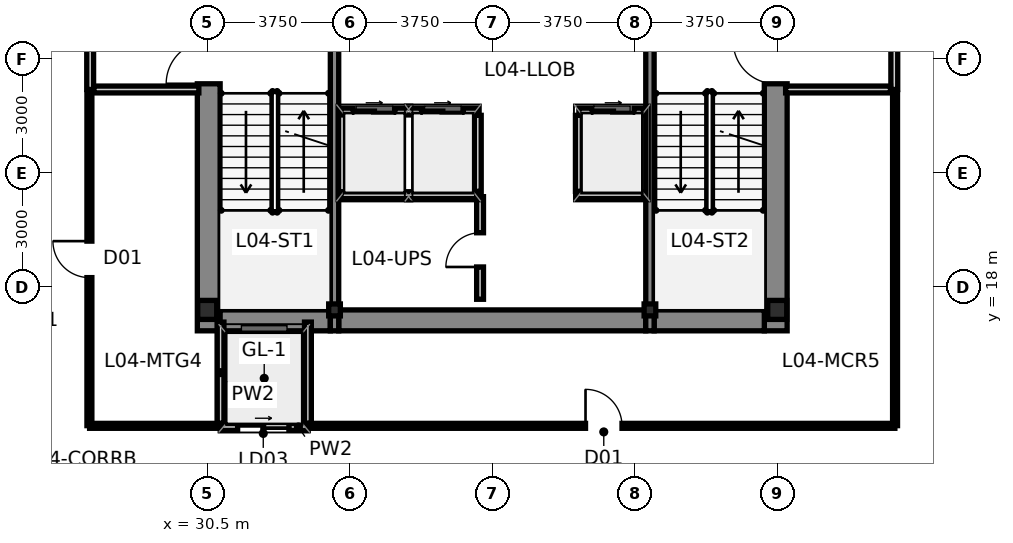
"""IFC4 building model, lengths in metres.
Left out: names, types, materials, properties, quantities, classifications, styles, units other than length and angle.
Written with IfcOpenShell. Run it as: python <this file> out.ifc"""

import sys

from ifc_helpers import new_model, si_unit, direction, frame, frame_2d, origin, origin_2d, place, context, subcontext, project, spatial, rectangle, i_section, extrude, source, transform, mapped, element, fill, save


model = new_model("IFC4")
c1 = context("Model", 3, precision=1e-05, world=origin(), true_north=direction((0.0, 1.0)))
c2 = subcontext(c1, "Body", "Model", "MODEL_VIEW")
j1 = project(units=[si_unit("LENGTHUNIT", "METRE"), si_unit("PLANEANGLEUNIT", "RADIAN")], contexts=[c1])
p1 = place(None, origin())
s1 = spatial("IfcSite", under=j1, at=p1, CompositionType="ELEMENT")
p2 = place(p1, origin())
s2 = spatial("IfcBuilding", under=s1, at=p2, CompositionType="ELEMENT")
p3 = place(p2, frame((0.0, 0.0, 18.9)))
s3 = spatial("IfcBuildingStorey", under=s2, at=p3, CompositionType="ELEMENT", Elevation=18.9)
m1 = source(origin(), c2, "Body", "SweptSolid", [
    extrude(i_section(OverallWidth=0.5, OverallDepth=0.5, WebThickness=0.028, FlangeThickness=0.04, at=origin_2d()), origin(), (0.0, 0.0, 1.0), 4.2),
])
for number, where, z_axis, x_axis in (
    (1, (30.5, 17.4, 0.0), (0.0, 0.0, 1.0), (1.0, 0.0, 0.0)),
    (2, (45.5, 17.4, 0.0), (0.0, 0.0, 1.0), (1.0, 0.0, 0.0)),
):
    element("IfcColumn", number, at=place(p3, frame(where, z_axis=z_axis, x_axis=x_axis)), inside=s3, PredefinedType="COLUMN", context=c2, shape_type="MappedRepresentation", body=[
        mapped(m1, transform((0.0, 0.0, 0.0), scale=1.0)),
    ])
m2 = source(origin(), c2, "Body", "SweptSolid", [
    extrude(i_section(OverallWidth=0.307, OverallDepth=0.315, WebThickness=0.012, FlangeThickness=0.019, at=origin_2d()), origin(), (0.0, 0.0, 1.0), 4.2),
])
for number, where, z_axis, x_axis in (
    (3, (33.85, 17.4, 0.0), (0.0, 0.0, 1.0), (1.0, 0.0, 0.0)),
    (4, (42.15, 17.4, 0.0), (0.0, 0.0, 1.0), (1.0, 0.0, 0.0)),
):
    element("IfcColumn", number, at=place(p3, frame(where, z_axis=z_axis, x_axis=x_axis)), inside=s3, PredefinedType="COLUMN", context=c2, shape_type="MappedRepresentation", body=[
        mapped(m2, transform((0.0, 0.0, 0.0), scale=1.0)),
    ])
p4 = place(p3, frame((30.54, 16.85, 0.0), z_axis=(0.0, 0.0, 1.0), x_axis=(0.0, 1.0, 0.0)))
e5 = element("IfcWall", 5, at=p4, inside=s3, PredefinedType="SHEAR", context=c2, shape_type="SweptSolid", body=[
    extrude(rectangle(XDim=13.425, YDim=0.6, at=frame_2d((6.712, 0.0))), origin(), (0.0, 0.0, 1.0), 4.2),
])
p5 = place(p4, frame((6.5, 0.0, 0.0)))
e6 = element("IfcOpeningElement", 6, at=p5, cuts=e5, PredefinedType="OPENING", context=c2, shape_type="SweptSolid", body=[
    extrude(rectangle(XDim=1.12, YDim=2.15, at=frame_2d((0.56, 1.075))), frame((0.0, 0.312, 0.0), z_axis=(0.0, -1.0, 0.0), x_axis=(1.0, 0.0, 0.0)), (0.0, 0.0, 1.0), 0.624),
])
p6 = place(p4, frame((10.95, 0.0, 0.0)))
e7 = element("IfcOpeningElement", 7, at=p6, cuts=e5, PredefinedType="OPENING", context=c2, shape_type="SweptSolid", body=[
    extrude(rectangle(XDim=1.2, YDim=2.2, at=frame_2d((0.6, 1.1))), frame((0.0, 0.312, 0.0), z_axis=(0.0, -1.0, 0.0), x_axis=(1.0, 0.0, 0.0)), (0.0, 0.0, 1.0), 0.624),
])
p7 = place(p3, frame((45.46, 16.85, 0.0), z_axis=(0.0, 0.0, 1.0), x_axis=(0.0, 1.0, 0.0)))
e8 = element("IfcWall", 8, at=p7, inside=s3, PredefinedType="SHEAR", context=c2, shape_type="SweptSolid", body=[
    extrude(rectangle(XDim=13.425, YDim=0.6, at=frame_2d((6.712, 0.0))), origin(), (0.0, 0.0, 1.0), 4.2),
])
p8 = place(p7, frame((6.5, 0.0, 0.0)))
e9 = element("IfcOpeningElement", 9, at=p8, cuts=e8, PredefinedType="OPENING", context=c2, shape_type="SweptSolid", body=[
    extrude(rectangle(XDim=1.12, YDim=2.15, at=frame_2d((0.56, 1.075))), frame((0.0, 0.312, 0.0), z_axis=(0.0, -1.0, 0.0), x_axis=(1.0, 0.0, 0.0)), (0.0, 0.0, 1.0), 0.624),
])
p9 = place(p7, frame((10.95, 0.0, 0.0)))
e10 = element("IfcOpeningElement", 10, at=p9, cuts=e8, PredefinedType="OPENING", context=c2, shape_type="SweptSolid", body=[
    extrude(rectangle(XDim=1.2, YDim=2.2, at=frame_2d((0.6, 1.1))), frame((0.0, 0.312, 0.0), z_axis=(0.0, -1.0, 0.0), x_axis=(1.0, 0.0, 0.0)), (0.0, 0.0, 1.0), 0.624),
])
p10 = place(p3, frame((30.84, 17.125, 0.0), z_axis=(0.0, 0.0, 1.0), x_axis=(1.0, 0.0, 0.0)))
e11 = element("IfcWall", 11, at=p10, inside=s3, PredefinedType="SHEAR", context=c2, shape_type="SweptSolid", body=[
    extrude(rectangle(XDim=2.9, YDim=0.55, at=frame_2d((1.45, 0.0))), origin(), (0.0, 0.0, 1.0), 4.2),
])
p11 = place(p3, frame((33.96, 17.125, 0.0), z_axis=(0.0, 0.0, 1.0), x_axis=(1.0, 0.0, 0.0)))
e12 = element("IfcWall", 12, at=p11, inside=s3, PredefinedType="SHEAR", context=c2, shape_type="SweptSolid", body=[
    extrude(rectangle(XDim=8.08, YDim=0.55, at=frame_2d((4.04, 0.0))), origin(), (0.0, 0.0, 1.0), 4.2),
])
p12 = place(p3, frame((42.26, 17.125, 0.0), z_axis=(0.0, 0.0, 1.0), x_axis=(1.0, 0.0, 0.0)))
e13 = element("IfcWall", 13, at=p12, inside=s3, PredefinedType="SHEAR", context=c2, shape_type="SweptSolid", body=[
    extrude(rectangle(XDim=2.9, YDim=0.55, at=frame_2d((1.45, 0.0))), origin(), (0.0, 0.0, 1.0), 4.2),
])
for number, where, z_axis, x_axis in (
    (14, (33.85, 16.85, 0.0), (0.0, 0.0, 1.0), (0.0, 1.0, 0.0)),
    (15, (42.15, 16.85, 0.0), (0.0, 0.0, 1.0), (0.0, 1.0, 0.0)),
):
    element("IfcWall", number, at=place(p3, frame(where, z_axis=z_axis, x_axis=x_axis)), inside=s3, PredefinedType="SHEAR", context=c2, shape_type="SweptSolid", body=[
        extrude(rectangle(XDim=13.425, YDim=0.22, at=frame_2d((6.712, 0.0))), origin(), (0.0, 0.0, 1.0), 4.2),
    ])
p13 = place(p3, frame((30.85, 14.32, 0.0), z_axis=(0.0, 0.0, 1.0), x_axis=(1.0, 0.0, 0.0)))
e16 = element("IfcWall", 16, at=p13, inside=s3, PredefinedType="PARTITIONING", context=c2, shape_type="SweptSolid", body=[
    extrude(rectangle(XDim=2.3, YDim=0.18, at=frame_2d((1.15, 0.0))), origin(), (0.0, 0.0, 1.0), 3.75),
])
p14 = place(p13, frame((0.45, 0.0, 0.0)))
e17 = element("IfcOpeningElement", 17, at=p14, cuts=e16, PredefinedType="OPENING", context=c2, shape_type="SweptSolid", body=[
    extrude(rectangle(XDim=1.35, YDim=2.25, at=frame_2d((0.675, 1.125))), frame((0.0, 0.102, 0.0), z_axis=(0.0, -1.0, 0.0), x_axis=(1.0, 0.0, 0.0)), (0.0, 0.0, 1.0), 0.204),
])
p15 = place(p3, frame((30.85, 14.42, 0.0), z_axis=(0.0, 0.0, 1.0), x_axis=(0.0, 1.0, 0.0)))
e18 = element("IfcWall", 18, at=p15, inside=s3, PredefinedType="PARTITIONING", context=c2, shape_type="SweptSolid", body=[
    extrude(rectangle(XDim=2.66, YDim=0.18, at=frame_2d((1.33, 0.0))), origin(), (0.0, 0.0, 1.0), 3.124),
])
p16 = place(p3, frame((33.15, 14.42, 0.0), z_axis=(0.0, 0.0, 1.0), x_axis=(0.0, 1.0, 0.0)))
e19 = element("IfcWall", 19, at=p16, inside=s3, PredefinedType="PARTITIONING", context=c2, shape_type="SweptSolid", body=[
    extrude(rectangle(XDim=2.66, YDim=0.18, at=frame_2d((1.33, 0.0))), origin(), (0.0, 0.0, 1.0), 3.75),
])
p17 = place(p3, frame((34.02, 22.62, 0.0), z_axis=(0.0, 0.0, 1.0), x_axis=(1.0, 0.0, 0.0)))
e20 = element("IfcWall", 20, at=p17, inside=s3, PredefinedType="PARTITIONING", context=c2, shape_type="SweptSolid", body=[
    extrude(rectangle(XDim=3.6, YDim=0.18, at=frame_2d((1.8, 0.0))), origin(), (0.0, 0.0, 1.0), 3.75),
])
p18 = place(p17, frame((0.32, 0.0, 0.0)))
e21 = element("IfcOpeningElement", 21, at=p18, cuts=e20, PredefinedType="OPENING", context=c2, shape_type="SweptSolid", body=[
    extrude(rectangle(XDim=1.1, YDim=2.2, at=frame_2d((0.55, 1.1))), frame((0.0, 0.102, 0.0), z_axis=(0.0, -1.0, 0.0), x_axis=(1.0, 0.0, 0.0)), (0.0, 0.0, 1.0), 0.204),
])
p19 = place(p17, frame((2.12, 0.0, 0.0)))
e22 = element("IfcOpeningElement", 22, at=p19, cuts=e20, PredefinedType="OPENING", context=c2, shape_type="SweptSolid", body=[
    extrude(rectangle(XDim=1.1, YDim=2.2, at=frame_2d((0.55, 1.1))), frame((0.0, 0.102, 0.0), z_axis=(0.0, -1.0, 0.0), x_axis=(1.0, 0.0, 0.0)), (0.0, 0.0, 1.0), 0.204),
])
p20 = place(p3, frame((40.28, 22.62, 0.0), z_axis=(0.0, 0.0, 1.0), x_axis=(1.0, 0.0, 0.0)))
e23 = element("IfcWall", 23, at=p20, inside=s3, PredefinedType="PARTITIONING", context=c2, shape_type="SweptSolid", body=[
    extrude(rectangle(XDim=1.7, YDim=0.18, at=frame_2d((0.85, 0.0))), origin(), (0.0, 0.0, 1.0), 3.75),
])
p21 = place(p20, frame((0.35, 0.0, 0.0)))
e24 = element("IfcOpeningElement", 24, at=p21, cuts=e23, PredefinedType="OPENING", context=c2, shape_type="SweptSolid", body=[
    extrude(rectangle(XDim=1.1, YDim=2.2, at=frame_2d((0.55, 1.1))), frame((0.0, 0.102, 0.0), z_axis=(0.0, -1.0, 0.0), x_axis=(1.0, 0.0, 0.0)), (0.0, 0.0, 1.0), 0.204),
])
for number, where, z_axis, x_axis in (
    (25, (37.62, 20.52, 0.0), (0.0, 0.0, 1.0), (0.0, 1.0, 0.0)),
    (26, (40.28, 20.52, 0.0), (0.0, 0.0, 1.0), (0.0, 1.0, 0.0)),
):
    element("IfcWall", number, at=place(p3, frame(where, z_axis=z_axis, x_axis=x_axis)), inside=s3, PredefinedType="PARTITIONING", context=c2, shape_type="SweptSolid", body=[
        extrude(rectangle(XDim=2.0, YDim=0.18, at=frame_2d((1.0, 0.0))), origin(), (0.0, 0.0, 1.0), 3.75),
    ])
p22 = place(p3, frame((27.42, 23.2, 0.0), z_axis=(0.0, 0.0, 1.0), x_axis=(0.0, 1.0, 0.0)))
e27 = element("IfcWall", 27, at=p22, inside=s3, PredefinedType="PARTITIONING", context=c2, shape_type="SweptSolid", body=[
    extrude(rectangle(XDim=6.4, YDim=0.18, at=frame_2d((3.2, 0.0))), origin(), (0.0, 0.0, 1.0), 3.376),
])
p23 = place(p22, frame((2.65, 0.0, 0.0)))
e28 = element("IfcOpeningElement", 28, at=p23, cuts=e27, PredefinedType="OPENING", context=c2, shape_type="SweptSolid", body=[
    extrude(rectangle(XDim=1.05, YDim=2.15, at=frame_2d((0.525, 1.075))), frame((0.0, 0.102, 0.0), z_axis=(0.0, -1.0, 0.0), x_axis=(1.0, 0.0, 0.0)), (0.0, 0.0, 1.0), 0.204),
])
p24 = place(p3, frame((27.52, 23.2, 0.0), z_axis=(0.0, 0.0, 1.0), x_axis=(1.0, 0.0, 0.0)))
e29 = element("IfcWall", 29, at=p24, inside=s3, PredefinedType="PARTITIONING", context=c2, shape_type="SweptSolid", body=[
    extrude(rectangle(XDim=2.76, YDim=0.18, at=frame_2d((1.38, 0.0))), origin(), (0.0, 0.0, 1.0), 3.75),
])
p25 = place(p3, frame((48.58, 23.2, 0.0), z_axis=(0.0, 0.0, 1.0), x_axis=(0.0, 1.0, 0.0)))
e30 = element("IfcWall", 30, at=p25, inside=s3, PredefinedType="PARTITIONING", context=c2, shape_type="SweptSolid", body=[
    extrude(rectangle(XDim=6.4, YDim=0.18, at=frame_2d((3.2, 0.0))), origin(), (0.0, 0.0, 1.0), 3.75),
])
p26 = place(p25, frame((2.65, 0.0, 0.0)))
e31 = element("IfcOpeningElement", 31, at=p26, cuts=e30, PredefinedType="OPENING", context=c2, shape_type="SweptSolid", body=[
    extrude(rectangle(XDim=1.05, YDim=2.15, at=frame_2d((0.525, 1.075))), frame((0.0, 0.102, 0.0), z_axis=(0.0, -1.0, 0.0), x_axis=(1.0, 0.0, 0.0)), (0.0, 0.0, 1.0), 0.204),
])
p27 = place(p3, frame((45.72, 23.2, 0.0), z_axis=(0.0, 0.0, 1.0), x_axis=(1.0, 0.0, 0.0)))
e32 = element("IfcWall", 32, at=p27, inside=s3, PredefinedType="PARTITIONING", context=c2, shape_type="SweptSolid", body=[
    extrude(rectangle(XDim=2.76, YDim=0.18, at=frame_2d((1.38, 0.0))), origin(), (0.0, 0.0, 1.0), 3.75),
])
p28 = place(p3, frame((34.02, 20.42, 0.0), z_axis=(0.0, 0.0, 1.0), x_axis=(1.0, 0.0, 0.0)))
e33 = element("IfcWall", 33, at=p28, inside=s3, PredefinedType="PARTITIONING", context=c2, shape_type="SweptSolid", body=[
    extrude(rectangle(XDim=3.64, YDim=0.18, at=frame_2d((1.82, 0.0))), origin(), (0.0, 0.0, 1.0), 3.75),
])
p29 = place(p3, frame((40.22, 20.42, 0.0), z_axis=(0.0, 0.0, 1.0), x_axis=(1.0, 0.0, 0.0)))
e34 = element("IfcWall", 34, at=p29, inside=s3, PredefinedType="PARTITIONING", context=c2, shape_type="SweptSolid", body=[
    extrude(rectangle(XDim=1.76, YDim=0.18, at=frame_2d((0.88, 0.0))), origin(), (0.0, 0.0, 1.0), 3.75),
])
p30 = place(p3, frame((37.68, 17.68, 0.0), z_axis=(0.0, 0.0, 1.0), x_axis=(0.0, 1.0, 0.0)))
e35 = element("IfcWall", 35, at=p30, inside=s3, PredefinedType="PARTITIONING", context=c2, shape_type="SweptSolid", body=[
    extrude(rectangle(XDim=2.7, YDim=0.18, at=frame_2d((1.35, 0.0))), origin(), (0.0, 0.0, 1.0), 3.75),
])
p31 = place(p30, frame((0.85, 0.0, 0.0)))
e36 = element("IfcOpeningElement", 36, at=p31, cuts=e35, PredefinedType="OPENING", context=c2, shape_type="SweptSolid", body=[
    extrude(rectangle(XDim=0.9, YDim=2.1, at=frame_2d((0.45, 1.05))), frame((0.0, 0.102, 0.0), z_axis=(0.0, -1.0, 0.0), x_axis=(1.0, 0.0, 0.0)), (0.0, 0.0, 1.0), 0.204),
])
p32 = place(p3, frame((33.275, 14.35, 0.0), z_axis=(0.0, 0.0, 1.0), x_axis=(1.0, 0.0, 0.0)))
e37 = element("IfcWall", 37, at=p32, inside=s3, PredefinedType="PARTITIONING", context=c2, shape_type="SweptSolid", body=[
    extrude(rectangle(XDim=15.32, YDim=0.13, at=frame_2d((7.66, 0.0))), origin(), (0.0, 0.0, 1.0), 3.75),
])
p33 = place(p32, frame((7.18, 0.0, 0.0)))
e38 = element("IfcOpeningElement", 38, at=p33, cuts=e37, PredefinedType="OPENING", context=c2, shape_type="SweptSolid", body=[
    extrude(rectangle(XDim=0.96, YDim=2.15, at=frame_2d((0.48, 1.075))), frame((0.0, 0.077, 0.0), z_axis=(0.0, -1.0, 0.0), x_axis=(1.0, 0.0, 0.0)), (0.0, 0.0, 1.0), 0.154),
])
p34 = place(p3, frame((27.4, 14.355, 0.0), z_axis=(0.0, 0.0, 1.0), x_axis=(0.0, 1.0, 0.0)))
e39 = element("IfcWall", 39, at=p34, inside=s3, PredefinedType="PARTITIONING", context=c2, shape_type="SweptSolid", body=[
    extrude(rectangle(XDim=8.75, YDim=0.13, at=frame_2d((4.375, 0.0))), origin(), (0.0, 0.0, 1.0), 3.376),
])
p35 = place(p34, frame((3.895, 0.0, 0.0)))
e40 = element("IfcOpeningElement", 40, at=p35, cuts=e39, PredefinedType="OPENING", context=c2, shape_type="SweptSolid", body=[
    extrude(rectangle(XDim=0.96, YDim=2.15, at=frame_2d((0.48, 1.075))), frame((0.0, 0.077, 0.0), z_axis=(0.0, -1.0, 0.0), x_axis=(1.0, 0.0, 0.0)), (0.0, 0.0, 1.0), 0.154),
])
p36 = place(p3, frame((48.6, 14.355, 0.0), z_axis=(0.0, 0.0, 1.0), x_axis=(0.0, 1.0, 0.0)))
e41 = element("IfcWall", 41, at=p36, inside=s3, PredefinedType="PARTITIONING", context=c2, shape_type="SweptSolid", body=[
    extrude(rectangle(XDim=8.75, YDim=0.13, at=frame_2d((4.375, 0.0))), origin(), (0.0, 0.0, 1.0), 3.75),
])
p37 = place(p3, frame((30.725, 14.35, 0.0), z_axis=(0.0, 0.0, 1.0), x_axis=(-1.0, 0.0, 0.0)))
e42 = element("IfcWall", 42, at=p37, inside=s3, PredefinedType="PARTITIONING", context=c2, shape_type="SweptSolid", body=[
    extrude(rectangle(XDim=3.32, YDim=0.13, at=frame_2d((1.66, 0.0))), origin(), (0.0, 0.0, 1.0), 3.75),
])
p38 = place(p5, origin())
e43 = element("IfcDoor", 43, at=p38, inside=s3, OperationType="SINGLE_SWING_LEFT", PredefinedType="DOOR", context=c2, shape_type="SweptSolid", body=[
    extrude(rectangle(XDim=1.12, YDim=2.15, at=frame_2d((0.56, 1.075))), frame((0.0, 0.025, 0.0), z_axis=(0.0, -1.0, 0.0), x_axis=(1.0, 0.0, 0.0)), (0.0, 0.0, 1.0), 0.05),
])
fill(e6, e43)
p39 = place(p8, origin())
e44 = element("IfcDoor", 44, at=p39, inside=s3, OperationType="SINGLE_SWING_RIGHT", PredefinedType="DOOR", context=c2, shape_type="SweptSolid", body=[
    extrude(rectangle(XDim=1.12, YDim=2.15, at=frame_2d((0.56, 1.075))), frame((0.0, 0.025, 0.0), z_axis=(0.0, -1.0, 0.0), x_axis=(1.0, 0.0, 0.0)), (0.0, 0.0, 1.0), 0.05),
])
fill(e9, e44)
p40 = place(p14, origin())
e45 = element("IfcDoor", 45, at=p40, inside=s3, OperationType="SLIDING_TO_LEFT", PredefinedType="DOOR", context=c2, shape_type="SweptSolid", body=[
    extrude(rectangle(XDim=1.35, YDim=2.25, at=frame_2d((0.675, 1.125))), frame((0.0, 0.025, 0.0), z_axis=(0.0, -1.0, 0.0), x_axis=(1.0, 0.0, 0.0)), (0.0, 0.0, 1.0), 0.05),
])
fill(e17, e45)
p41 = place(p18, origin())
e46 = element("IfcDoor", 46, at=p41, inside=s3, OperationType="SLIDING_TO_LEFT", PredefinedType="DOOR", context=c2, shape_type="SweptSolid", body=[
    extrude(rectangle(XDim=1.1, YDim=2.2, at=frame_2d((0.55, 1.1))), frame((0.0, 0.025, 0.0), z_axis=(0.0, -1.0, 0.0), x_axis=(1.0, 0.0, 0.0)), (0.0, 0.0, 1.0), 0.05),
])
fill(e21, e46)
p42 = place(p19, origin())
e47 = element("IfcDoor", 47, at=p42, inside=s3, OperationType="SLIDING_TO_RIGHT", PredefinedType="DOOR", context=c2, shape_type="SweptSolid", body=[
    extrude(rectangle(XDim=1.1, YDim=2.2, at=frame_2d((0.55, 1.1))), frame((0.0, 0.025, 0.0), z_axis=(0.0, -1.0, 0.0), x_axis=(1.0, 0.0, 0.0)), (0.0, 0.0, 1.0), 0.05),
])
fill(e22, e47)
p43 = place(p21, origin())
e48 = element("IfcDoor", 48, at=p43, inside=s3, OperationType="SLIDING_TO_LEFT", PredefinedType="DOOR", context=c2, shape_type="SweptSolid", body=[
    extrude(rectangle(XDim=1.1, YDim=2.2, at=frame_2d((0.55, 1.1))), frame((0.0, 0.025, 0.0), z_axis=(0.0, -1.0, 0.0), x_axis=(1.0, 0.0, 0.0)), (0.0, 0.0, 1.0), 0.05),
])
fill(e24, e48)
p44 = place(p31, origin())
e49 = element("IfcDoor", 49, at=p44, inside=s3, OperationType="SINGLE_SWING_LEFT", PredefinedType="DOOR", context=c2, shape_type="SweptSolid", body=[
    extrude(rectangle(XDim=0.9, YDim=2.1, at=frame_2d((0.45, 1.05))), frame((0.0, 0.025, 0.0), z_axis=(0.0, -1.0, 0.0), x_axis=(1.0, 0.0, 0.0)), (0.0, 0.0, 1.0), 0.05),
])
fill(e36, e49)
p45 = place(p33, origin())
e50 = element("IfcDoor", 50, at=p45, inside=s3, OperationType="SINGLE_SWING_LEFT", PredefinedType="DOOR", context=c2, shape_type="SweptSolid", body=[
    extrude(rectangle(XDim=0.96, YDim=2.15, at=frame_2d((0.48, 1.075))), frame((0.0, 0.025, 0.0), z_axis=(0.0, -1.0, 0.0), x_axis=(1.0, 0.0, 0.0)), (0.0, 0.0, 1.0), 0.05),
])
fill(e38, e50)
p46 = place(p35, origin())
e51 = element("IfcDoor", 51, at=p46, inside=s3, OperationType="SINGLE_SWING_RIGHT", PredefinedType="DOOR", context=c2, shape_type="SweptSolid", body=[
    extrude(rectangle(XDim=0.96, YDim=2.15, at=frame_2d((0.48, 1.075))), frame((0.0, 0.025, 0.0), z_axis=(0.0, -1.0, 0.0), x_axis=(1.0, 0.0, 0.0)), (0.0, 0.0, 1.0), 0.05),
])
fill(e40, e51)
save(model, sys.argv[1])
